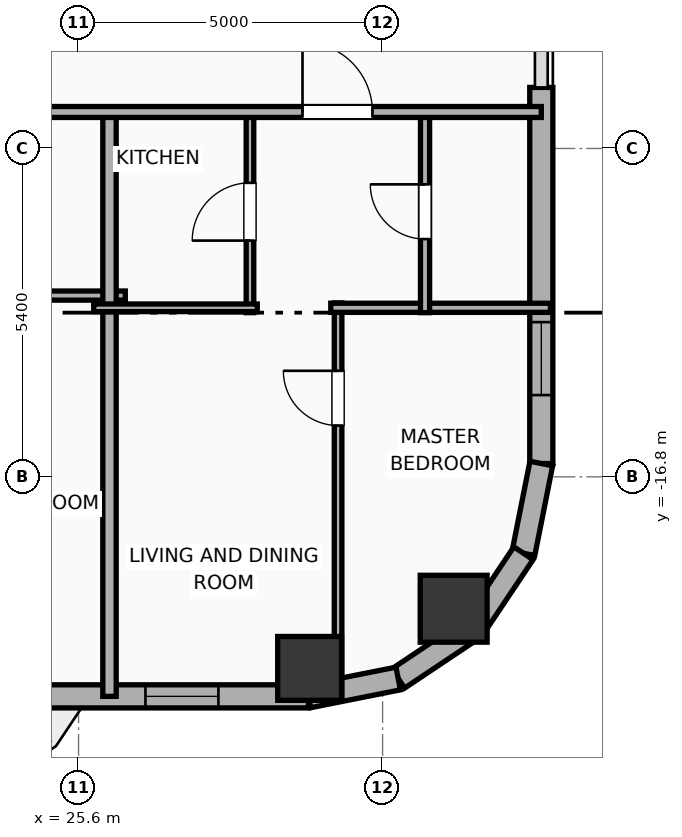
"""IFC4 building model, lengths in metres.
Left out: names, types, materials, properties, quantities, classifications, styles, units other than length and angle.
Written with IfcOpenShell. Run it as: python <this file> out.ifc"""

import sys

from ifc_helpers import new_model, si_unit, direction, frame, frame_2d, origin, origin_2d, place, context, subcontext, project, spatial, rectangle, hollow_rectangle, hollow_circle, extrude, element, fill, save


model = new_model("IFC4")
c1 = context("Model", 3, precision=1e-05, world=origin(), true_north=direction((0.0, 1.0)))
c2 = subcontext(c1, "Body", "Model", "MODEL_VIEW")
j1 = project(units=[si_unit("LENGTHUNIT", "METRE"), si_unit("PLANEANGLEUNIT", "RADIAN")], contexts=[c1])
p1 = place(None, origin())
s1 = spatial("IfcSite", under=j1, at=p1, CompositionType="ELEMENT")
p2 = place(p1, origin())
s2 = spatial("IfcBuilding", under=s1, at=p2, CompositionType="ELEMENT")
p3 = place(p2, frame((0.0, 0.0, 85.8)))
s3 = spatial("IfcBuildingStorey", under=s2, at=p3, CompositionType="ELEMENT", Elevation=85.8)
p4 = place(p3, frame((29.4, -19.95, -0.4), z_axis=(0.0, 0.0, 1.0), x_axis=(1.0, 0.0, 0.0)))
e1 = element("IfcColumn", 1, at=p4, inside=s3, PredefinedType="COLUMN", context=c2, shape_type="SweptSolid", body=[
    extrude(hollow_rectangle(XDim=1.05, YDim=1.05, WallThickness=0.036, at=origin_2d()), origin(), (0.0, 0.0, 1.0), 4.3),
])
p5 = place(p3, frame((31.769, -18.969, -0.4), z_axis=(0.0, 0.0, 1.0), x_axis=(1.0, 0.0, 0.0)))
e2 = element("IfcColumn", 2, at=p5, inside=s3, PredefinedType="COLUMN", context=c2, shape_type="SweptSolid", body=[
    extrude(hollow_circle(Radius=0.55, WallThickness=0.036, at=origin_2d()), origin(), (0.0, 0.0, 1.0), 4.3),
])
p6 = place(p3, frame((29.381, -20.41, 0.0), z_axis=(0.0, 0.0, 1.0), x_axis=(-1.0, 0.0, 0.0)))
e3 = element("IfcWall", 3, at=p6, inside=s3, PredefinedType="ELEMENTEDWALL", context=c2, shape_type="SweptSolid", body=[
    extrude(rectangle(XDim=54.763, YDim=0.38, at=frame_2d((27.381, 0.0))), origin(), (0.0, 0.0, 1.0), 2.54),
])
p7 = place(p6, frame((18.486, 0.0, 0.75)))
e4 = element("IfcOpeningElement", 4, at=p7, cuts=e3, PredefinedType="OPENING", context=c2, shape_type="SweptSolid", body=[
    extrude(rectangle(XDim=2.4, YDim=1.45, at=frame_2d((1.2, 0.725))), frame((0.0, 0.2, 0.0), z_axis=(0.0, -1.0, 0.0), x_axis=(1.0, 0.0, 0.0)), (0.0, 0.0, 1.0), 0.4),
])
p8 = place(p6, frame((47.567, 0.0, 0.75)))
e5 = element("IfcOpeningElement", 5, at=p8, cuts=e3, PredefinedType="OPENING", context=c2, shape_type="SweptSolid", body=[
    extrude(rectangle(XDim=2.4, YDim=1.45, at=frame_2d((1.2, 0.725))), frame((0.0, 0.2, 0.0), z_axis=(0.0, -1.0, 0.0), x_axis=(1.0, 0.0, 0.0)), (0.0, 0.0, 1.0), 0.4),
])
p9 = place(p6, frame((7.464, 0.0, 0.0)))
e6 = element("IfcOpeningElement", 6, at=p9, cuts=e3, PredefinedType="OPENING", context=c2, shape_type="SweptSolid", body=[
    extrude(rectangle(XDim=1.5, YDim=2.05, at=frame_2d((0.75, 1.025))), frame((0.0, 0.2, 0.0), z_axis=(0.0, -1.0, 0.0), x_axis=(1.0, 0.0, 0.0)), (0.0, 0.0, 1.0), 0.4),
])
p10 = place(p6, frame((51.831, 0.0, 0.55)))
e7 = element("IfcOpeningElement", 7, at=p10, cuts=e3, PredefinedType="OPENING", context=c2, shape_type="SweptSolid", body=[
    extrude(rectangle(XDim=1.2, YDim=1.15, at=frame_2d((0.6, 0.575))), frame((0.0, 0.2, 0.0), z_axis=(0.0, -1.0, 0.0), x_axis=(1.0, 0.0, 0.0)), (0.0, 0.0, 1.0), 0.4),
])
p11 = place(p6, frame((44.606, 0.0, 0.55)))
e8 = element("IfcOpeningElement", 8, at=p11, cuts=e3, PredefinedType="OPENING", context=c2, shape_type="SweptSolid", body=[
    extrude(rectangle(XDim=1.2, YDim=1.15, at=frame_2d((0.6, 0.575))), frame((0.0, 0.2, 0.0), z_axis=(0.0, -1.0, 0.0), x_axis=(1.0, 0.0, 0.0)), (0.0, 0.0, 1.0), 0.4),
])
p12 = place(p6, frame((38.906, 0.0, 0.55)))
e9 = element("IfcOpeningElement", 9, at=p12, cuts=e3, PredefinedType="OPENING", context=c2, shape_type="SweptSolid", body=[
    extrude(rectangle(XDim=1.2, YDim=1.15, at=frame_2d((0.6, 0.575))), frame((0.0, 0.2, 0.0), z_axis=(0.0, -1.0, 0.0), x_axis=(1.0, 0.0, 0.0)), (0.0, 0.0, 1.0), 0.4),
])
p13 = place(p6, frame((41.656, 0.0, 0.55)))
e10 = element("IfcOpeningElement", 10, at=p13, cuts=e3, PredefinedType="OPENING", context=c2, shape_type="SweptSolid", body=[
    extrude(rectangle(XDim=1.2, YDim=1.15, at=frame_2d((0.6, 0.575))), frame((0.0, 0.2, 0.0), z_axis=(0.0, -1.0, 0.0), x_axis=(1.0, 0.0, 0.0)), (0.0, 0.0, 1.0), 0.4),
])
p14 = place(p6, frame((33.666, 0.0, 0.55)))
e11 = element("IfcOpeningElement", 11, at=p14, cuts=e3, PredefinedType="OPENING", context=c2, shape_type="SweptSolid", body=[
    extrude(rectangle(XDim=1.2, YDim=1.15, at=frame_2d((0.6, 0.575))), frame((0.0, 0.2, 0.0), z_axis=(0.0, -1.0, 0.0), x_axis=(1.0, 0.0, 0.0)), (0.0, 0.0, 1.0), 0.4),
])
p15 = place(p6, frame((36.176, 0.0, 0.55)))
e12 = element("IfcOpeningElement", 12, at=p15, cuts=e3, PredefinedType="OPENING", context=c2, shape_type="SweptSolid", body=[
    extrude(rectangle(XDim=1.2, YDim=1.15, at=frame_2d((0.6, 0.575))), frame((0.0, 0.2, 0.0), z_axis=(0.0, -1.0, 0.0), x_axis=(1.0, 0.0, 0.0)), (0.0, 0.0, 1.0), 0.4),
])
p16 = place(p6, frame((27.861, 0.0, 0.55)))
e13 = element("IfcOpeningElement", 13, at=p16, cuts=e3, PredefinedType="OPENING", context=c2, shape_type="SweptSolid", body=[
    extrude(rectangle(XDim=1.2, YDim=1.15, at=frame_2d((0.6, 0.575))), frame((0.0, 0.2, 0.0), z_axis=(0.0, -1.0, 0.0), x_axis=(1.0, 0.0, 0.0)), (0.0, 0.0, 1.0), 0.4),
])
p17 = place(p6, frame((30.611, 0.0, 0.55)))
e14 = element("IfcOpeningElement", 14, at=p17, cuts=e3, PredefinedType="OPENING", context=c2, shape_type="SweptSolid", body=[
    extrude(rectangle(XDim=1.2, YDim=1.15, at=frame_2d((0.6, 0.575))), frame((0.0, 0.2, 0.0), z_axis=(0.0, -1.0, 0.0), x_axis=(1.0, 0.0, 0.0)), (0.0, 0.0, 1.0), 0.4),
])
p18 = place(p6, frame((23.531, 0.0, 0.55)))
e15 = element("IfcOpeningElement", 15, at=p18, cuts=e3, PredefinedType="OPENING", context=c2, shape_type="SweptSolid", body=[
    extrude(rectangle(XDim=1.2, YDim=1.15, at=frame_2d((0.6, 0.575))), frame((0.0, 0.2, 0.0), z_axis=(0.0, -1.0, 0.0), x_axis=(1.0, 0.0, 0.0)), (0.0, 0.0, 1.0), 0.4),
])
p19 = place(p6, frame((16.386, 0.0, 0.55)))
e16 = element("IfcOpeningElement", 16, at=p19, cuts=e3, PredefinedType="OPENING", context=c2, shape_type="SweptSolid", body=[
    extrude(rectangle(XDim=1.2, YDim=1.15, at=frame_2d((0.6, 0.575))), frame((0.0, 0.2, 0.0), z_axis=(0.0, -1.0, 0.0), x_axis=(1.0, 0.0, 0.0)), (0.0, 0.0, 1.0), 0.4),
])
p20 = place(p6, frame((12.531, 0.0, 0.55)))
e17 = element("IfcOpeningElement", 17, at=p20, cuts=e3, PredefinedType="OPENING", context=c2, shape_type="SweptSolid", body=[
    extrude(rectangle(XDim=1.2, YDim=1.15, at=frame_2d((0.6, 0.575))), frame((0.0, 0.2, 0.0), z_axis=(0.0, -1.0, 0.0), x_axis=(1.0, 0.0, 0.0)), (0.0, 0.0, 1.0), 0.4),
])
p21 = place(p6, frame((4.377, 0.0, 0.55)))
e18 = element("IfcOpeningElement", 18, at=p21, cuts=e3, PredefinedType="OPENING", context=c2, shape_type="SweptSolid", body=[
    extrude(rectangle(XDim=1.2, YDim=1.15, at=frame_2d((0.6, 0.575))), frame((0.0, 0.2, 0.0), z_axis=(0.0, -1.0, 0.0), x_axis=(1.0, 0.0, 0.0)), (0.0, 0.0, 1.0), 0.4),
])
p22 = place(p6, frame((1.481, 0.0, 0.55)))
e19 = element("IfcOpeningElement", 19, at=p22, cuts=e3, PredefinedType="OPENING", context=c2, shape_type="SweptSolid", body=[
    extrude(rectangle(XDim=1.2, YDim=1.15, at=frame_2d((0.6, 0.575))), frame((0.0, 0.2, 0.0), z_axis=(0.0, -1.0, 0.0), x_axis=(1.0, 0.0, 0.0)), (0.0, 0.0, 1.0), 0.4),
])
p23 = place(p3, frame((33.21, -10.396, 0.0), z_axis=(0.0, 0.0, 1.0), x_axis=(0.0, -1.0, 0.0)))
e20 = element("IfcWall", 20, at=p23, inside=s3, PredefinedType="ELEMENTEDWALL", context=c2, shape_type="SweptSolid", body=[
    extrude(rectangle(XDim=6.185, YDim=0.38, at=frame_2d((3.093, 0.0))), origin(), (0.0, 0.0, 1.0), 2.54),
])
p24 = place(p23, frame((3.86, 0.0, 0.55)))
e21 = element("IfcOpeningElement", 21, at=p24, cuts=e20, PredefinedType="OPENING", context=c2, shape_type="SweptSolid", body=[
    extrude(rectangle(XDim=1.2, YDim=1.15, at=frame_2d((0.6, 0.575))), frame((0.0, 0.2, 0.0), z_axis=(0.0, -1.0, 0.0), x_axis=(1.0, 0.0, 0.0)), (0.0, 0.0, 1.0), 0.4),
])
p25 = place(p3, frame((33.21, -16.581, 0.0), z_axis=(0.0, 0.0, 1.0), x_axis=(-0.195086038585, -0.980786132421, 0.0)))
e22 = element("IfcWall", 22, at=p25, inside=s3, PredefinedType="ELEMENTEDWALL", context=c2, shape_type="SweptSolid", body=[
    extrude(rectangle(XDim=1.504, YDim=0.38, at=frame_2d((0.752, 0.0))), origin(), (0.0, 0.0, 1.0), 3.65),
])
p26 = place(p3, frame((32.917, -18.057, 0.0), z_axis=(0.0, 0.0, 1.0), x_axis=(-0.555610286119, -0.831442848281, 0.0)))
e23 = element("IfcWall", 23, at=p26, inside=s3, PredefinedType="ELEMENTEDWALL", context=c2, shape_type="SweptSolid", body=[
    extrude(rectangle(XDim=1.485, YDim=0.38, at=frame_2d((0.743, 0.0))), origin(), (0.0, 0.0, 1.0), 3.65),
])
p27 = place(p3, frame((32.091, -19.292, 0.0), z_axis=(0.0, 0.0, 1.0), x_axis=(-0.831468045563, -0.555572577804, 0.0)))
e24 = element("IfcWall", 24, at=p27, inside=s3, PredefinedType="ELEMENTEDWALL", context=c2, shape_type="SweptSolid", body=[
    extrude(rectangle(XDim=1.485, YDim=0.38, at=frame_2d((0.742, 0.0))), origin(), (0.0, 0.0, 1.0), 2.54),
])
p28 = place(p3, frame((30.857, -20.116, 0.0), z_axis=(0.0, 0.0, 1.0), x_axis=(-0.980786132421, -0.195086038585, 0.0)))
e25 = element("IfcWall", 25, at=p28, inside=s3, PredefinedType="ELEMENTEDWALL", context=c2, shape_type="SweptSolid", body=[
    extrude(rectangle(XDim=1.504, YDim=0.38, at=frame_2d((0.752, 0.0))), origin(), (0.0, 0.0, 1.0), 2.54),
])
p29 = place(p3, frame((22.579, -13.819, 0.0), z_axis=(0.0, 0.0, 1.0), x_axis=(1.0, 0.0, 0.0)))
e26 = element("IfcWall", 26, at=p29, inside=s3, PredefinedType="PLUMBINGWALL", context=c2, shape_type="SweptSolid", body=[
    extrude(rectangle(XDim=3.79, YDim=0.15, at=frame_2d((1.895, 0.0))), origin(), (0.0, 0.0, 1.0), 3.65),
])
p30 = place(p3, frame((26.109, -20.41, 0.0), z_axis=(0.0, 0.0, 1.0), x_axis=(0.0, 1.0, 0.0)))
e27 = element("IfcWall", 27, at=p30, inside=s3, PredefinedType="PARTITIONING", context=c2, shape_type="SweptSolid", body=[
    extrude(rectangle(XDim=9.69, YDim=0.22, at=frame_2d((4.845, 0.0))), origin(), (0.0, 0.0, 1.0), 3.65),
])
p31 = place(p3, frame((29.868, -20.466, 0.0), z_axis=(0.0, 0.0, 1.0), x_axis=(0.0, 1.0, 0.0)))
e28 = element("IfcWall", 28, at=p31, inside=s3, PredefinedType="PARTITIONING", context=c2, shape_type="SweptSolid", body=[
    extrude(rectangle(XDim=6.526, YDim=0.125, at=frame_2d((3.263, 0.0))), origin(), (0.0, 0.0, 1.0), 3.65),
])
p32 = place(p31, frame((4.51, 0.0, 0.0)))
e29 = element("IfcOpeningElement", 29, at=p32, cuts=e28, PredefinedType="OPENING", context=c2, shape_type="SweptSolid", body=[
    extrude(rectangle(XDim=0.9, YDim=2.05, at=frame_2d((0.45, 1.025))), frame((0.0, 0.073, 0.0), z_axis=(0.0, -1.0, 0.0), x_axis=(1.0, 0.0, 0.0)), (0.0, 0.0, 1.0), 0.145),
])
p33 = place(p3, frame((29.748, -14.02, 0.0), z_axis=(0.0, 0.0, 1.0), x_axis=(1.0, 0.0, 0.0)))
e30 = element("IfcWall", 30, at=p33, inside=s3, PredefinedType="PLUMBINGWALL", context=c2, shape_type="SweptSolid", body=[
    extrude(rectangle(XDim=3.612, YDim=0.15, at=frame_2d((1.806, 0.0))), origin(), (0.0, 0.0, 1.0), 3.65),
])
p34 = place(p3, frame((28.419, -14.1, 0.0), z_axis=(0.0, 0.0, 1.0), x_axis=(0.0, 1.0, 0.0)))
e31 = element("IfcWall", 31, at=p34, inside=s3, PredefinedType="PARTITIONING", context=c2, shape_type="SweptSolid", body=[
    extrude(rectangle(XDim=3.32, YDim=0.125, at=frame_2d((1.66, 0.0))), origin(), (0.0, 0.0, 1.0), 3.65),
])
p35 = place(p34, frame((1.185, 0.0, 0.0)))
e32 = element("IfcOpeningElement", 32, at=p35, cuts=e31, PredefinedType="OPENING", context=c2, shape_type="SweptSolid", body=[
    extrude(rectangle(XDim=0.95, YDim=2.05, at=frame_2d((0.475, 1.025))), frame((0.0, 0.073, 0.0), z_axis=(0.0, -1.0, 0.0), x_axis=(1.0, 0.0, 0.0)), (0.0, 0.0, 1.0), 0.145),
])
p36 = place(p3, frame((25.849, -14.02, 0.0), z_axis=(0.0, 0.0, 1.0), x_axis=(1.0, 0.0, 0.0)))
e33 = element("IfcWall", 33, at=p36, inside=s3, PredefinedType="PARTITIONING", context=c2, shape_type="SweptSolid", body=[
    extrude(rectangle(XDim=2.69, YDim=0.125, at=frame_2d((1.345, 0.0))), origin(), (0.0, 0.0, 1.0), 3.65),
])
p37 = place(p3, frame((31.298, -14.1, 0.0), z_axis=(0.0, 0.0, 1.0), x_axis=(0.0, 1.0, 0.0)))
e34 = element("IfcWall", 34, at=p37, inside=s3, PredefinedType="PLUMBINGWALL", context=c2, shape_type="SweptSolid", body=[
    extrude(rectangle(XDim=3.32, YDim=0.15, at=frame_2d((1.66, 0.0))), origin(), (0.0, 0.0, 1.0), 3.65),
])
p38 = place(p37, frame((1.21, 0.0, 0.0)))
e35 = element("IfcOpeningElement", 35, at=p38, cuts=e34, PredefinedType="OPENING", context=c2, shape_type="SweptSolid", body=[
    extrude(rectangle(XDim=0.9, YDim=2.05, at=frame_2d((0.45, 1.025))), frame((0.0, 0.085, 0.0), z_axis=(0.0, -1.0, 0.0), x_axis=(1.0, 0.0, 0.0)), (0.0, 0.0, 1.0), 0.17),
])
p39 = place(p3, frame((-29.21, -10.8, 0.0), z_axis=(0.0, 0.0, 1.0), x_axis=(1.0, 0.0, 0.0)))
e36 = element("IfcWall", 36, at=p39, inside=s3, PredefinedType="PARTITIONING", context=c2, shape_type="SweptSolid", body=[
    extrude(rectangle(XDim=62.42, YDim=0.18, at=frame_2d((31.21, 0.0))), origin(), (0.0, 0.0, 1.0), 3.65),
])
p40 = place(p39, frame((3.357, 0.0, 0.0)))
e37 = element("IfcOpeningElement", 37, at=p40, cuts=e36, PredefinedType="OPENING", context=c2, shape_type="SweptSolid", body=[
    extrude(rectangle(XDim=1.15, YDim=2.05, at=frame_2d((0.575, 1.025))), frame((0.0, 0.1, 0.0), z_axis=(0.0, -1.0, 0.0), x_axis=(1.0, 0.0, 0.0)), (0.0, 0.0, 1.0), 0.2),
])
p41 = place(p39, frame((10.998, 0.0, 0.0)))
e38 = element("IfcOpeningElement", 38, at=p41, cuts=e36, PredefinedType="OPENING", context=c2, shape_type="SweptSolid", body=[
    extrude(rectangle(XDim=1.15, YDim=2.05, at=frame_2d((0.575, 1.025))), frame((0.0, 0.1, 0.0), z_axis=(0.0, -1.0, 0.0), x_axis=(1.0, 0.0, 0.0)), (0.0, 0.0, 1.0), 0.2),
])
p42 = place(p39, frame((18.482, 0.0, 0.0)))
e39 = element("IfcOpeningElement", 39, at=p42, cuts=e36, PredefinedType="OPENING", context=c2, shape_type="SweptSolid", body=[
    extrude(rectangle(XDim=1.15, YDim=2.05, at=frame_2d((0.575, 1.025))), frame((0.0, 0.1, 0.0), z_axis=(0.0, -1.0, 0.0), x_axis=(1.0, 0.0, 0.0)), (0.0, 0.0, 1.0), 0.2),
])
p43 = place(p39, frame((23.962, 0.0, 0.0)))
e40 = element("IfcOpeningElement", 40, at=p43, cuts=e36, PredefinedType="OPENING", context=c2, shape_type="SweptSolid", body=[
    extrude(rectangle(XDim=1.15, YDim=2.05, at=frame_2d((0.575, 1.025))), frame((0.0, 0.1, 0.0), z_axis=(0.0, -1.0, 0.0), x_axis=(1.0, 0.0, 0.0)), (0.0, 0.0, 1.0), 0.2),
])
p44 = place(p39, frame((29.524, 0.0, 0.0)))
e41 = element("IfcOpeningElement", 41, at=p44, cuts=e36, PredefinedType="OPENING", context=c2, shape_type="SweptSolid", body=[
    extrude(rectangle(XDim=1.15, YDim=2.05, at=frame_2d((0.575, 1.025))), frame((0.0, 0.1, 0.0), z_axis=(0.0, -1.0, 0.0), x_axis=(1.0, 0.0, 0.0)), (0.0, 0.0, 1.0), 0.2),
])
p45 = place(p39, frame((34.218, 0.0, 0.0)))
e42 = element("IfcOpeningElement", 42, at=p45, cuts=e36, PredefinedType="OPENING", context=c2, shape_type="SweptSolid", body=[
    extrude(rectangle(XDim=0.9, YDim=2.05, at=frame_2d((0.45, 1.025))), frame((0.0, 0.1, 0.0), z_axis=(0.0, -1.0, 0.0), x_axis=(1.0, 0.0, 0.0)), (0.0, 0.0, 1.0), 0.2),
])
p46 = place(p39, frame((38.313, 0.0, 0.0)))
e43 = element("IfcOpeningElement", 43, at=p46, cuts=e36, PredefinedType="OPENING", context=c2, shape_type="SweptSolid", body=[
    extrude(rectangle(XDim=1.15, YDim=2.05, at=frame_2d((0.575, 1.025))), frame((0.0, 0.1, 0.0), z_axis=(0.0, -1.0, 0.0), x_axis=(1.0, 0.0, 0.0)), (0.0, 0.0, 1.0), 0.2),
])
p47 = place(p39, frame((45.223, 0.0, 0.0)))
e44 = element("IfcOpeningElement", 44, at=p47, cuts=e36, PredefinedType="OPENING", context=c2, shape_type="SweptSolid", body=[
    extrude(rectangle(XDim=0.9, YDim=2.05, at=frame_2d((0.45, 1.025))), frame((0.0, 0.1, 0.0), z_axis=(0.0, -1.0, 0.0), x_axis=(1.0, 0.0, 0.0)), (0.0, 0.0, 1.0), 0.2),
])
p48 = place(p39, frame((51.352, 0.0, 0.0)))
e45 = element("IfcOpeningElement", 45, at=p48, cuts=e36, PredefinedType="OPENING", context=c2, shape_type="SweptSolid", body=[
    extrude(rectangle(XDim=1.15, YDim=2.05, at=frame_2d((0.575, 1.025))), frame((0.0, 0.1, 0.0), z_axis=(0.0, -1.0, 0.0), x_axis=(1.0, 0.0, 0.0)), (0.0, 0.0, 1.0), 0.2),
])
p49 = place(p39, frame((58.493, 0.0, 0.0)))
e46 = element("IfcOpeningElement", 46, at=p49, cuts=e36, PredefinedType="OPENING", context=c2, shape_type="SweptSolid", body=[
    extrude(rectangle(XDim=1.15, YDim=2.05, at=frame_2d((0.575, 1.025))), frame((0.0, 0.1, 0.0), z_axis=(0.0, -1.0, 0.0), x_axis=(1.0, 0.0, 0.0)), (0.0, 0.0, 1.0), 0.2),
])
p50 = place(p22, origin())
e47 = element("IfcWindow", 47, at=p50, inside=s3, PartitioningType="SINGLE_PANEL", PredefinedType="WINDOW", context=c2, shape_type="SweptSolid", body=[
    extrude(rectangle(XDim=1.2, YDim=1.15, at=frame_2d((0.6, 0.575))), frame((0.0, 0.03, 0.0), z_axis=(0.0, -1.0, 0.0), x_axis=(1.0, 0.0, 0.0)), (0.0, 0.0, 1.0), 0.06),
])
fill(e19, e47)
p51 = place(p24, origin())
e48 = element("IfcWindow", 48, at=p51, inside=s3, PartitioningType="SINGLE_PANEL", PredefinedType="WINDOW", context=c2, shape_type="SweptSolid", body=[
    extrude(rectangle(XDim=1.2, YDim=1.15, at=frame_2d((0.6, 0.575))), frame((0.0, 0.03, 0.0), z_axis=(0.0, -1.0, 0.0), x_axis=(1.0, 0.0, 0.0)), (0.0, 0.0, 1.0), 0.06),
])
fill(e21, e48)
p52 = place(p32, origin())
e49 = element("IfcDoor", 49, at=p52, inside=s3, OperationType="SINGLE_SWING_RIGHT", PredefinedType="DOOR", context=c2, shape_type="SweptSolid", body=[
    extrude(rectangle(XDim=0.9, YDim=2.05, at=frame_2d((0.45, 1.025))), frame((0.0, 0.025, 0.0), z_axis=(0.0, -1.0, 0.0), x_axis=(1.0, 0.0, 0.0)), (0.0, 0.0, 1.0), 0.05),
])
fill(e29, e49)
p53 = place(p35, origin())
e50 = element("IfcDoor", 50, at=p53, inside=s3, OperationType="SINGLE_SWING_LEFT", PredefinedType="DOOR", context=c2, shape_type="SweptSolid", body=[
    extrude(rectangle(XDim=0.95, YDim=2.05, at=frame_2d((0.475, 1.025))), frame((0.0, 0.025, 0.0), z_axis=(0.0, -1.0, 0.0), x_axis=(1.0, 0.0, 0.0)), (0.0, 0.0, 1.0), 0.05),
])
fill(e32, e50)
p54 = place(p38, origin())
e51 = element("IfcDoor", 51, at=p54, inside=s3, OperationType="SINGLE_SWING_RIGHT", PredefinedType="DOOR", context=c2, shape_type="SweptSolid", body=[
    extrude(rectangle(XDim=0.9, YDim=2.05, at=frame_2d((0.45, 1.025))), frame((0.0, 0.025, 0.0), z_axis=(0.0, -1.0, 0.0), x_axis=(1.0, 0.0, 0.0)), (0.0, 0.0, 1.0), 0.05),
])
fill(e35, e51)
p55 = place(p49, origin())
e52 = element("IfcDoor", 52, at=p55, inside=s3, OperationType="SINGLE_SWING_LEFT", PredefinedType="DOOR", context=c2, shape_type="SweptSolid", body=[
    extrude(rectangle(XDim=1.15, YDim=2.05, at=frame_2d((0.575, 1.025))), frame((0.0, 0.025, 0.0), z_axis=(0.0, -1.0, 0.0), x_axis=(1.0, 0.0, 0.0)), (0.0, 0.0, 1.0), 0.05),
])
fill(e46, e52)
save(model, sys.argv[1])
